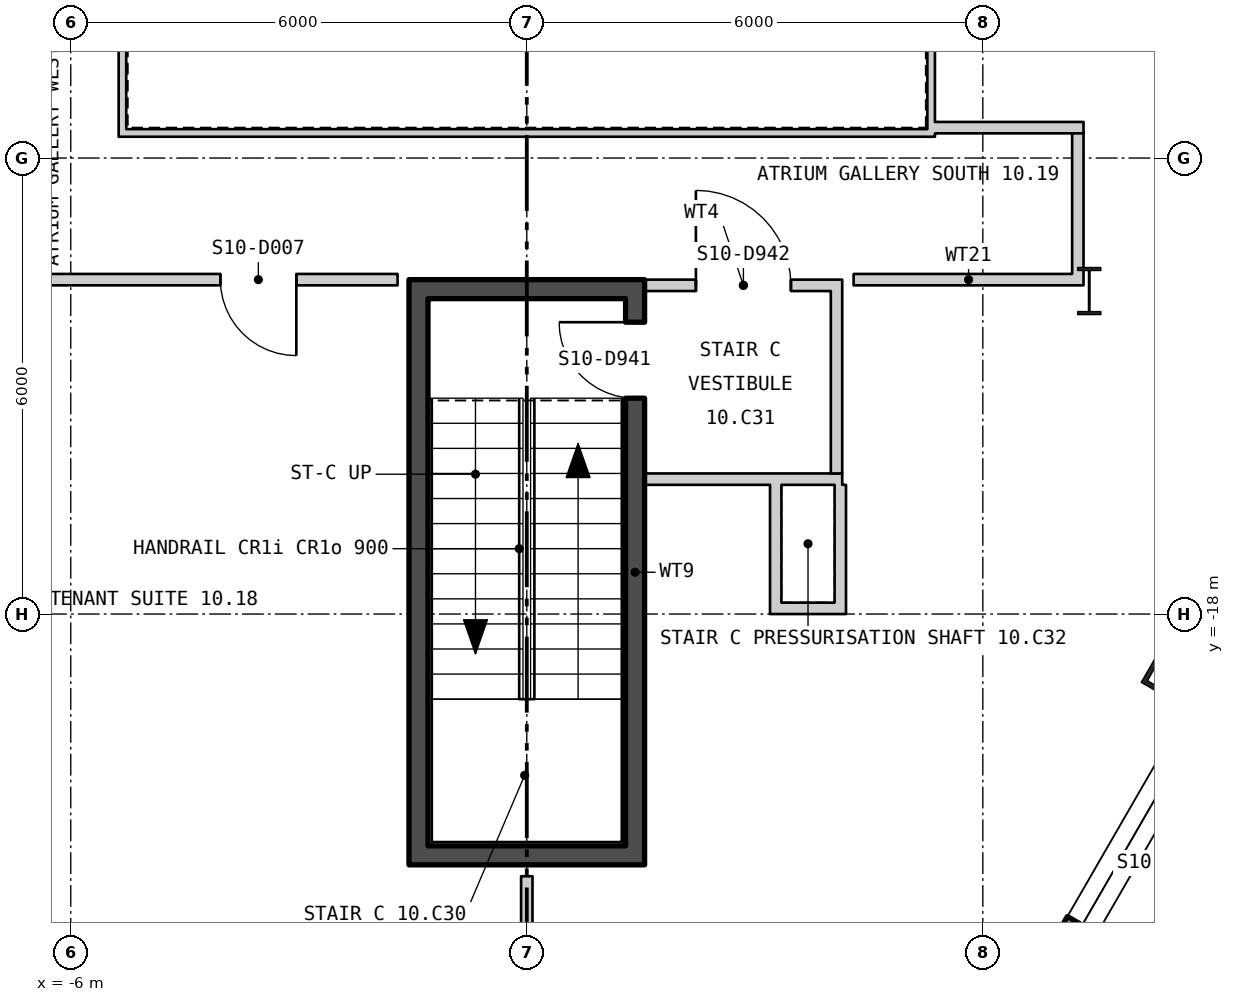
"""IFC4 building model, lengths in metres.
Left out: names, types, materials, properties, quantities, classifications, styles, units other than length and angle.
Written with IfcOpenShell. Run it as: python <this file> out.ifc"""

import sys

from ifc_helpers import new_model, si_unit, direction, frame, frame_2d, origin, origin_2d, place, context, subcontext, project, spatial, polyline, rectangle, hollow_rectangle, i_section, outline, extrude, element, fill, save


model = new_model("IFC4")
c1 = context("Model", 3, precision=1e-05, world=origin(), true_north=direction((0.0, 1.0)))
c2 = subcontext(c1, "Body", "Model", "MODEL_VIEW")
j1 = project(units=[si_unit("LENGTHUNIT", "METRE"), si_unit("PLANEANGLEUNIT", "RADIAN")], contexts=[c1])
p1 = place(None, origin())
s1 = spatial("IfcSite", under=j1, at=p1, CompositionType="ELEMENT")
p2 = place(p1, origin())
s2 = spatial("IfcBuilding", under=s1, at=p2, CompositionType="ELEMENT")
p3 = place(p2, frame((0.0, 0.0, 139.8)))
s3 = spatial("IfcBuildingStorey", under=s2, at=p3, CompositionType="ELEMENT", Elevation=139.8)
p4 = place(p3, frame((8.537, -18.814, 0.0), z_axis=(0.0, 0.0, 1.0), x_axis=(0.5, 0.866025403784, 0.0)))
e1 = element("IfcColumn", 1, at=p4, inside=s3, PredefinedType="COLUMN", context=c2, shape_type="SweptSolid", body=[
    extrude(hollow_rectangle(XDim=0.6, YDim=0.7, WallThickness=0.06, at=origin_2d()), origin(), (0.0, 0.0, 1.0), 3.9),
])
p5 = place(p3, frame((7.4, -13.75, 0.0), z_axis=(0.0, 0.0, 1.0), x_axis=(1.0, 0.0, 0.0)))
e2 = element("IfcColumn", 2, at=p5, inside=s3, PredefinedType="COLUMN", context=c2, shape_type="SweptSolid", body=[
    extrude(i_section(OverallWidth=0.305, OverallDepth=0.62, WebThickness=0.021, FlangeThickness=0.04, at=origin_2d()), origin(), (0.0, 0.0, 1.0), 3.9),
])
p6 = place(p3, frame((-27.235, 12.423, -0.18), z_axis=(0.0, 0.0, 1.0), x_axis=(0.500000335318, -0.866025210188, 0.0)))
e3 = element("IfcWall", 3, at=p6, inside=s3, PredefinedType="SOLIDWALL", context=c2, shape_type="SweptSolid", body=[
    extrude(outline(polyline([(-0.13, -0.225), (45.88, -0.225), (45.62, 0.225), (0.13, 0.225), (-0.13, -0.225)])), origin(), (0.0, 0.0, 1.0), 3.68),
])
p7 = place(p6, frame((1.425, 0.0, 1.08)))
e4 = element("IfcOpeningElement", 4, at=p7, cuts=e3, PredefinedType="OPENING", context=c2, shape_type="SweptSolid", body=[
    extrude(rectangle(XDim=2.4, YDim=2.0, at=frame_2d((1.2, 1.0))), frame((0.0, 0.235, 0.0), z_axis=(0.0, -1.0, 0.0), x_axis=(1.0, 0.0, 0.0)), (0.0, 0.0, 1.0), 0.47),
])
p8 = place(p6, frame((5.895, 0.0, 1.08)))
e5 = element("IfcOpeningElement", 5, at=p8, cuts=e3, PredefinedType="OPENING", context=c2, shape_type="SweptSolid", body=[
    extrude(rectangle(XDim=2.4, YDim=2.0, at=frame_2d((1.2, 1.0))), frame((0.0, 0.235, 0.0), z_axis=(0.0, -1.0, 0.0), x_axis=(1.0, 0.0, 0.0)), (0.0, 0.0, 1.0), 0.47),
])
p9 = place(p6, frame((10.403, 0.0, 1.08)))
e6 = element("IfcOpeningElement", 6, at=p9, cuts=e3, PredefinedType="OPENING", context=c2, shape_type="SweptSolid", body=[
    extrude(rectangle(XDim=2.4, YDim=2.0, at=frame_2d((1.2, 1.0))), frame((0.0, 0.235, 0.0), z_axis=(0.0, -1.0, 0.0), x_axis=(1.0, 0.0, 0.0)), (0.0, 0.0, 1.0), 0.47),
])
p10 = place(p6, frame((14.912, 0.0, 1.08)))
e7 = element("IfcOpeningElement", 7, at=p10, cuts=e3, PredefinedType="OPENING", context=c2, shape_type="SweptSolid", body=[
    extrude(rectangle(XDim=2.4, YDim=2.0, at=frame_2d((1.2, 1.0))), frame((0.0, 0.235, 0.0), z_axis=(0.0, -1.0, 0.0), x_axis=(1.0, 0.0, 0.0)), (0.0, 0.0, 1.0), 0.47),
])
p11 = place(p6, frame((19.421, 0.0, 1.08)))
e8 = element("IfcOpeningElement", 8, at=p11, cuts=e3, PredefinedType="OPENING", context=c2, shape_type="SweptSolid", body=[
    extrude(rectangle(XDim=2.4, YDim=2.0, at=frame_2d((1.2, 1.0))), frame((0.0, 0.235, 0.0), z_axis=(0.0, -1.0, 0.0), x_axis=(1.0, 0.0, 0.0)), (0.0, 0.0, 1.0), 0.47),
])
p12 = place(p6, frame((23.929, 0.0, 1.08)))
e9 = element("IfcOpeningElement", 9, at=p12, cuts=e3, PredefinedType="OPENING", context=c2, shape_type="SweptSolid", body=[
    extrude(rectangle(XDim=2.4, YDim=2.0, at=frame_2d((1.2, 1.0))), frame((0.0, 0.235, 0.0), z_axis=(0.0, -1.0, 0.0), x_axis=(1.0, 0.0, 0.0)), (0.0, 0.0, 1.0), 0.47),
])
p13 = place(p6, frame((28.438, 0.0, 1.08)))
e10 = element("IfcOpeningElement", 10, at=p13, cuts=e3, PredefinedType="OPENING", context=c2, shape_type="SweptSolid", body=[
    extrude(rectangle(XDim=2.4, YDim=2.0, at=frame_2d((1.2, 1.0))), frame((0.0, 0.235, 0.0), z_axis=(0.0, -1.0, 0.0), x_axis=(1.0, 0.0, 0.0)), (0.0, 0.0, 1.0), 0.47),
])
p14 = place(p6, frame((32.947, 0.0, 1.08)))
e11 = element("IfcOpeningElement", 11, at=p14, cuts=e3, PredefinedType="OPENING", context=c2, shape_type="SweptSolid", body=[
    extrude(rectangle(XDim=2.4, YDim=2.0, at=frame_2d((1.2, 1.0))), frame((0.0, 0.235, 0.0), z_axis=(0.0, -1.0, 0.0), x_axis=(1.0, 0.0, 0.0)), (0.0, 0.0, 1.0), 0.47),
])
p15 = place(p6, frame((37.455, 0.0, 1.08)))
e12 = element("IfcOpeningElement", 12, at=p15, cuts=e3, PredefinedType="OPENING", context=c2, shape_type="SweptSolid", body=[
    extrude(rectangle(XDim=2.4, YDim=2.0, at=frame_2d((1.2, 1.0))), frame((0.0, 0.235, 0.0), z_axis=(0.0, -1.0, 0.0), x_axis=(1.0, 0.0, 0.0)), (0.0, 0.0, 1.0), 0.47),
])
p16 = place(p6, frame((41.925, 0.0, 1.08)))
e13 = element("IfcOpeningElement", 13, at=p16, cuts=e3, PredefinedType="OPENING", context=c2, shape_type="SweptSolid", body=[
    extrude(rectangle(XDim=2.4, YDim=2.0, at=frame_2d((1.2, 1.0))), frame((0.0, 0.235, 0.0), z_axis=(0.0, -1.0, 0.0), x_axis=(1.0, 0.0, 0.0)), (0.0, 0.0, 1.0), 0.47),
])
p17 = place(p3, frame((4.36, -27.198, -0.18), z_axis=(0.0, 0.0, 1.0), x_axis=(0.500000335318, 0.866025210188, 0.0)))
e14 = element("IfcWall", 14, at=p17, inside=s3, PredefinedType="SOLIDWALL", context=c2, shape_type="SweptSolid", body=[
    extrude(outline(polyline([(-0.13, -0.225), (45.88, -0.225), (45.62, 0.225), (0.13, 0.225), (-0.13, -0.225)])), origin(), (0.0, 0.0, 1.0), 3.68),
])
p18 = place(p17, frame((1.425, 0.0, 1.08)))
e15 = element("IfcOpeningElement", 15, at=p18, cuts=e14, PredefinedType="OPENING", context=c2, shape_type="SweptSolid", body=[
    extrude(rectangle(XDim=2.4, YDim=2.0, at=frame_2d((1.2, 1.0))), frame((0.0, 0.235, 0.0), z_axis=(0.0, -1.0, 0.0), x_axis=(1.0, 0.0, 0.0)), (0.0, 0.0, 1.0), 0.47),
])
p19 = place(p17, frame((5.895, 0.0, 1.08)))
e16 = element("IfcOpeningElement", 16, at=p19, cuts=e14, PredefinedType="OPENING", context=c2, shape_type="SweptSolid", body=[
    extrude(rectangle(XDim=2.4, YDim=2.0, at=frame_2d((1.2, 1.0))), frame((0.0, 0.235, 0.0), z_axis=(0.0, -1.0, 0.0), x_axis=(1.0, 0.0, 0.0)), (0.0, 0.0, 1.0), 0.47),
])
p20 = place(p17, frame((10.403, 0.0, 1.08)))
e17 = element("IfcOpeningElement", 17, at=p20, cuts=e14, PredefinedType="OPENING", context=c2, shape_type="SweptSolid", body=[
    extrude(rectangle(XDim=2.4, YDim=2.0, at=frame_2d((1.2, 1.0))), frame((0.0, 0.235, 0.0), z_axis=(0.0, -1.0, 0.0), x_axis=(1.0, 0.0, 0.0)), (0.0, 0.0, 1.0), 0.47),
])
p21 = place(p17, frame((14.912, 0.0, 1.08)))
e18 = element("IfcOpeningElement", 18, at=p21, cuts=e14, PredefinedType="OPENING", context=c2, shape_type="SweptSolid", body=[
    extrude(rectangle(XDim=2.4, YDim=2.0, at=frame_2d((1.2, 1.0))), frame((0.0, 0.235, 0.0), z_axis=(0.0, -1.0, 0.0), x_axis=(1.0, 0.0, 0.0)), (0.0, 0.0, 1.0), 0.47),
])
p22 = place(p17, frame((19.421, 0.0, 1.08)))
e19 = element("IfcOpeningElement", 19, at=p22, cuts=e14, PredefinedType="OPENING", context=c2, shape_type="SweptSolid", body=[
    extrude(rectangle(XDim=2.4, YDim=2.0, at=frame_2d((1.2, 1.0))), frame((0.0, 0.235, 0.0), z_axis=(0.0, -1.0, 0.0), x_axis=(1.0, 0.0, 0.0)), (0.0, 0.0, 1.0), 0.47),
])
p23 = place(p17, frame((23.929, 0.0, 1.08)))
e20 = element("IfcOpeningElement", 20, at=p23, cuts=e14, PredefinedType="OPENING", context=c2, shape_type="SweptSolid", body=[
    extrude(rectangle(XDim=2.4, YDim=2.0, at=frame_2d((1.2, 1.0))), frame((0.0, 0.235, 0.0), z_axis=(0.0, -1.0, 0.0), x_axis=(1.0, 0.0, 0.0)), (0.0, 0.0, 1.0), 0.47),
])
p24 = place(p17, frame((37.455, 0.0, 1.08)))
e21 = element("IfcOpeningElement", 21, at=p24, cuts=e14, PredefinedType="OPENING", context=c2, shape_type="SweptSolid", body=[
    extrude(rectangle(XDim=2.4, YDim=2.0, at=frame_2d((1.2, 1.0))), frame((0.0, 0.235, 0.0), z_axis=(0.0, -1.0, 0.0), x_axis=(1.0, 0.0, 0.0)), (0.0, 0.0, 1.0), 0.47),
])
p25 = place(p17, frame((41.925, 0.0, 1.08)))
e22 = element("IfcOpeningElement", 22, at=p25, cuts=e14, PredefinedType="OPENING", context=c2, shape_type="SweptSolid", body=[
    extrude(rectangle(XDim=2.4, YDim=2.0, at=frame_2d((1.2, 1.0))), frame((0.0, 0.235, 0.0), z_axis=(0.0, -1.0, 0.0), x_axis=(1.0, 0.0, 0.0)), (0.0, 0.0, 1.0), 0.47),
])
p26 = place(p3, frame((-5.37, -11.67, 0.0), z_axis=(0.0, 0.0, 1.0), x_axis=(1.0, 0.0, 0.0)))
e23 = element("IfcWall", 23, at=p26, inside=s3, PredefinedType="PARTITIONING", context=c2, shape_type="SweptSolid", body=[
    extrude(rectangle(XDim=10.74, YDim=0.1, at=frame_2d((5.37, 0.0))), origin(), (0.0, 0.0, 1.0), 3.7),
])
for number, where, z_axis, x_axis in (
    (24, (5.32, -11.62, 0.0), (0.0, 0.0, 1.0), (0.0, 1.0, 0.0)),
    (25, (-5.32, -3.58, 0.0), (0.0, 0.0, 1.0), (0.0, -1.0, 0.0)),
):
    element("IfcWall", number, at=place(p3, frame(where, z_axis=z_axis, x_axis=x_axis)), inside=s3, PredefinedType="PARTITIONING", context=c2, shape_type="SweptSolid", body=[
        extrude(rectangle(XDim=8.04, YDim=0.1, at=frame_2d((4.02, 0.0))), origin(), (0.0, 0.0, 1.0), 3.7),
    ])
p27 = place(p3, frame((-1.425, -21.05, 0.0), z_axis=(0.0, 0.0, 1.0), x_axis=(0.0, 1.0, 0.0)))
e26 = element("IfcWall", 26, at=p27, inside=s3, PredefinedType="SHEAR", context=c2, shape_type="SweptSolid", body=[
    extrude(rectangle(XDim=7.2, YDim=0.25, at=frame_2d((3.6, 0.0))), origin(), (0.0, 0.0, 1.0), 3.7),
])
p28 = place(p3, frame((1.425, -21.05, 0.0), z_axis=(0.0, 0.0, 1.0), x_axis=(0.0, 1.0, 0.0)))
e27 = element("IfcWall", 27, at=p28, inside=s3, PredefinedType="SHEAR", context=c2, shape_type="SweptSolid", body=[
    extrude(rectangle(XDim=7.2, YDim=0.25, at=frame_2d((3.6, 0.0))), origin(), (0.0, 0.0, 1.0), 3.7),
])
p29 = place(p28, frame((5.89, 0.0, 0.0)))
e28 = element("IfcOpeningElement", 28, at=p29, cuts=e27, PredefinedType="OPENING", context=c2, shape_type="SweptSolid", body=[
    extrude(rectangle(XDim=1.0, YDim=2.1, at=frame_2d((0.5, 1.05))), frame((0.0, 0.135, 0.0), z_axis=(0.0, -1.0, 0.0), x_axis=(1.0, 0.0, 0.0)), (0.0, 0.0, 1.0), 0.27),
])
for number, where, z_axis, x_axis in (
    (29, (-1.55, -21.175, 0.0), (0.0, 0.0, 1.0), (1.0, 0.0, 0.0)),
    (30, (-1.55, -13.725, 0.0), (0.0, 0.0, 1.0), (1.0, 0.0, 0.0)),
):
    element("IfcWall", number, at=place(p3, frame(where, z_axis=z_axis, x_axis=x_axis)), inside=s3, PredefinedType="SHEAR", context=c2, shape_type="SweptSolid", body=[
        extrude(rectangle(XDim=3.1, YDim=0.25, at=frame_2d((1.55, 0.0))), origin(), (0.0, 0.0, 1.0), 3.7),
    ])
p30 = place(p3, frame((1.55, -16.225, 0.0), z_axis=(0.0, 0.0, 1.0), x_axis=(1.0, 0.0, 0.0)))
e31 = element("IfcWall", 31, at=p30, inside=s3, PredefinedType="PARTITIONING", context=c2, shape_type="SweptSolid", body=[
    extrude(rectangle(XDim=2.6, YDim=0.15, at=frame_2d((1.3, 0.0))), origin(), (0.0, 0.0, 1.0), 3.7),
])
p31 = place(p3, frame((4.075, -16.15, 0.0), z_axis=(0.0, 0.0, 1.0), x_axis=(0.0, 1.0, 0.0)))
e32 = element("IfcWall", 32, at=p31, inside=s3, PredefinedType="PARTITIONING", context=c2, shape_type="SweptSolid", body=[
    extrude(rectangle(XDim=2.4, YDim=0.15, at=frame_2d((1.2, 0.0))), origin(), (0.0, 0.0, 1.0), 3.7),
])
p32 = place(p3, frame((1.55, -13.675, 0.0), z_axis=(0.0, 0.0, 1.0), x_axis=(1.0, 0.0, 0.0)))
e33 = element("IfcWall", 33, at=p32, inside=s3, PredefinedType="PARTITIONING", context=c2, shape_type="SweptSolid", body=[
    extrude(rectangle(XDim=2.6, YDim=0.15, at=frame_2d((1.3, 0.0))), origin(), (0.0, 0.0, 1.0), 2.79),
])
p33 = place(p32, frame((0.675, 0.0, 0.0)))
e34 = element("IfcOpeningElement", 34, at=p33, cuts=e33, PredefinedType="OPENING", context=c2, shape_type="SweptSolid", body=[
    extrude(rectangle(XDim=1.25, YDim=2.1, at=frame_2d((0.625, 1.05))), frame((0.0, 0.085, 0.0), z_axis=(0.0, -1.0, 0.0), x_axis=(1.0, 0.0, 0.0)), (0.0, 0.0, 1.0), 0.17),
])
p34 = place(p3, frame((3.275, -18.0, 0.0), z_axis=(0.0, 0.0, 1.0), x_axis=(0.0, 1.0, 0.0)))
e35 = element("IfcWall", 35, at=p34, inside=s3, PredefinedType="PARTITIONING", context=c2, shape_type="SweptSolid", body=[
    extrude(rectangle(XDim=1.7, YDim=0.15, at=frame_2d((0.85, 0.0))), origin(), (0.0, 0.0, 1.0), 3.01),
])
p35 = place(p3, frame((3.35, -17.925, 0.0), z_axis=(0.0, 0.0, 1.0), x_axis=(1.0, 0.0, 0.0)))
e36 = element("IfcWall", 36, at=p35, inside=s3, PredefinedType="PARTITIONING", context=c2, shape_type="SweptSolid", body=[
    extrude(rectangle(XDim=0.7, YDim=0.15, at=frame_2d((0.35, 0.0))), origin(), (0.0, 0.0, 1.0), 3.7),
])
p36 = place(p3, frame((4.125, -18.0, 0.0), z_axis=(0.0, 0.0, 1.0), x_axis=(0.0, 1.0, 0.0)))
e37 = element("IfcWall", 37, at=p36, inside=s3, PredefinedType="PARTITIONING", context=c2, shape_type="SweptSolid", body=[
    extrude(rectangle(XDim=1.7, YDim=0.15, at=frame_2d((0.85, 0.0))), origin(), (0.0, 0.0, 1.0), 3.7),
])
p37 = place(p3, frame((-7.175, -13.6, 0.0), z_axis=(0.0, 0.0, 1.0), x_axis=(1.0, 0.0, 0.0)))
e38 = element("IfcWall", 38, at=p37, inside=s3, PredefinedType="PARTITIONING", context=c2, shape_type="SweptSolid", body=[
    extrude(rectangle(XDim=5.475, YDim=0.15, at=frame_2d((2.737, 0.0))), origin(), (0.0, 0.0, 1.0), 2.79),
])
p38 = place(p37, frame((3.143, 0.0, 0.0)))
e39 = element("IfcOpeningElement", 39, at=p38, cuts=e38, PredefinedType="OPENING", context=c2, shape_type="SweptSolid", body=[
    extrude(rectangle(XDim=1.0, YDim=2.1, at=frame_2d((0.5, 1.05))), frame((0.0, 0.085, 0.0), z_axis=(0.0, -1.0, 0.0), x_axis=(1.0, 0.0, 0.0)), (0.0, 0.0, 1.0), 0.17),
])
p39 = place(p3, frame((0.0, -26.523, 0.0), z_axis=(0.0, 0.0, 1.0), x_axis=(0.0, 1.0, 0.0)))
e40 = element("IfcWall", 40, at=p39, inside=s3, PredefinedType="PARTITIONING", context=c2, shape_type="SweptSolid", body=[
    extrude(rectangle(XDim=5.073, YDim=0.15, at=frame_2d((2.537, 0.0))), origin(), (0.0, 0.0, 1.0), 3.15),
])
p40 = place(p3, frame((4.3, -13.6, 0.0), z_axis=(0.0, 0.0, 1.0), x_axis=(1.0, 0.0, 0.0)))
e41 = element("IfcWall", 41, at=p40, inside=s3, PredefinedType="PARTITIONING", context=c2, shape_type="SweptSolid", body=[
    extrude(rectangle(XDim=3.025, YDim=0.15, at=frame_2d((1.512, 0.0))), origin(), (0.0, 0.0, 1.0), 2.79),
])
p41 = place(p3, frame((5.37, -11.6, 0.0), z_axis=(0.0, 0.0, 1.0), x_axis=(1.0, 0.0, 0.0)))
e42 = element("IfcWall", 42, at=p41, inside=s3, PredefinedType="PARTITIONING", context=c2, shape_type="SweptSolid", body=[
    extrude(rectangle(XDim=1.955, YDim=0.15, at=frame_2d((0.978, 0.0))), origin(), (0.0, 0.0, 1.0), 3.7),
])
p42 = place(p3, frame((7.25, -13.525, 0.0), z_axis=(0.0, 0.0, 1.0), x_axis=(0.0, 1.0, 0.0)))
e43 = element("IfcWall", 43, at=p42, inside=s3, PredefinedType="PARTITIONING", context=c2, shape_type="SweptSolid", body=[
    extrude(rectangle(XDim=1.85, YDim=0.15, at=frame_2d((0.925, 0.0))), origin(), (0.0, 0.0, 1.0), 3.11),
])
p43 = place(p19, origin())
e44 = element("IfcWindow", 44, at=p43, inside=s3, PartitioningType="SINGLE_PANEL", PredefinedType="WINDOW", context=c2, shape_type="SweptSolid", body=[
    extrude(rectangle(XDim=2.4, YDim=2.0, at=frame_2d((1.2, 1.0))), frame((0.0, 0.105, 0.0), z_axis=(0.0, -1.0, 0.0), x_axis=(1.0, 0.0, 0.0)), (0.0, 0.0, 1.0), 0.06),
])
fill(e16, e44)
p44 = place(p29, origin())
e45 = element("IfcDoor", 45, at=p44, inside=s3, OperationType="SINGLE_SWING_LEFT", PredefinedType="DOOR", context=c2, shape_type="SweptSolid", body=[
    extrude(rectangle(XDim=1.0, YDim=2.1, at=frame_2d((0.5, 1.05))), frame((0.0, 0.025, 0.0), z_axis=(0.0, -1.0, 0.0), x_axis=(1.0, 0.0, 0.0)), (0.0, 0.0, 1.0), 0.05),
])
fill(e28, e45)
p45 = place(p33, origin())
e46 = element("IfcDoor", 46, at=p45, inside=s3, OperationType="SINGLE_SWING_RIGHT", PredefinedType="DOOR", context=c2, shape_type="SweptSolid", body=[
    extrude(rectangle(XDim=1.25, YDim=2.1, at=frame_2d((0.625, 1.05))), frame((0.0, 0.025, 0.0), z_axis=(0.0, -1.0, 0.0), x_axis=(1.0, 0.0, 0.0)), (0.0, 0.0, 1.0), 0.05),
])
fill(e34, e46)
p46 = place(p38, origin())
e47 = element("IfcDoor", 47, at=p46, inside=s3, OperationType="SINGLE_SWING_RIGHT", PredefinedType="DOOR", context=c2, shape_type="SweptSolid", body=[
    extrude(rectangle(XDim=1.0, YDim=2.1, at=frame_2d((0.5, 1.05))), frame((0.0, 0.025, 0.0), z_axis=(0.0, -1.0, 0.0), x_axis=(1.0, 0.0, 0.0)), (0.0, 0.0, 1.0), 0.05),
])
fill(e39, e47)
save(model, sys.argv[1])
